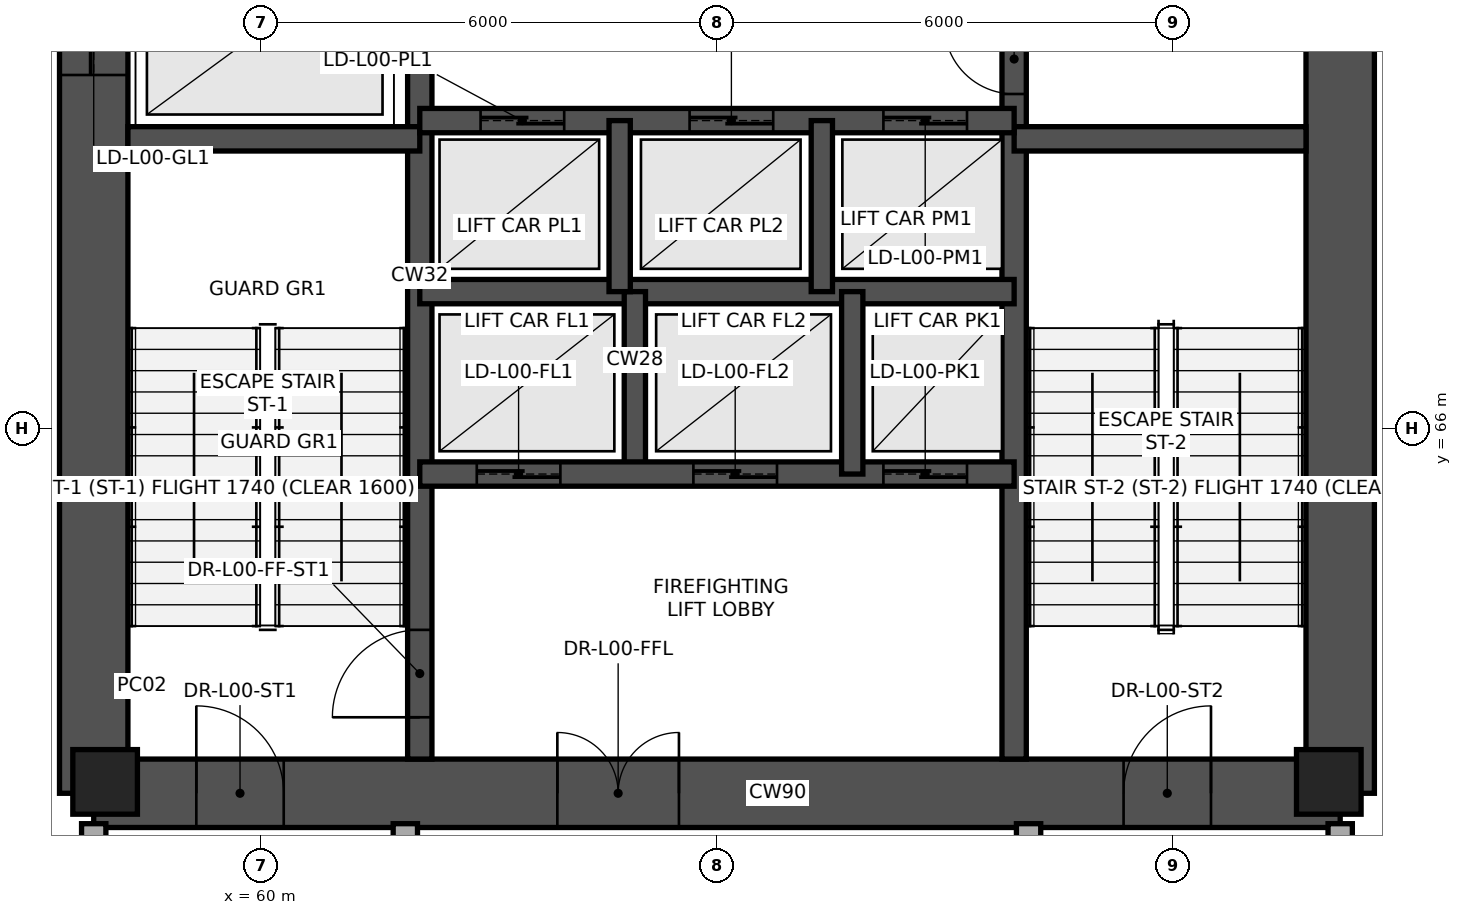
"""IFC4 building model, lengths in metres.
Left out: names, types, materials, properties, quantities, classifications, styles, units other than length and angle.
Written with IfcOpenShell. Run it as: python <this file> out.ifc"""

import sys

from ifc_helpers import new_model, si_unit, direction, frame, frame_2d, origin, origin_2d, place, context, subcontext, project, spatial, rectangle, extrude, element, fill, save


model = new_model("IFC4")
c1 = context("Model", 3, precision=1e-05, world=origin(), true_north=direction((0.0, 1.0)))
c2 = subcontext(c1, "Body", "Model", "MODEL_VIEW")
j1 = project(units=[si_unit("LENGTHUNIT", "METRE"), si_unit("PLANEANGLEUNIT", "RADIAN")], contexts=[c1])
p1 = place(None, origin())
s1 = spatial("IfcSite", under=j1, at=p1, CompositionType="ELEMENT")
p2 = place(p1, origin())
s2 = spatial("IfcBuilding", under=s1, at=p2, CompositionType="ELEMENT")
p3 = place(p2, origin())
s3 = spatial("IfcBuildingStorey", under=s2, at=p3, CompositionType="ELEMENT", Elevation=0.0)
p4 = place(p3, frame((57.8, 61.2, 0.0), z_axis=(0.0, 0.0, 1.0), x_axis=(1.0, 0.0, 0.0)))
e1 = element("IfcWall", 1, at=p4, inside=s3, PredefinedType="SHEAR", context=c2, shape_type="SweptSolid", body=[
    extrude(rectangle(XDim=16.4, YDim=0.9, at=frame_2d((8.2, 0.0))), origin(), (0.0, 0.0, 1.0), 5.4),
])
p5 = place(p4, frame((1.35, 0.0, 0.0)))
e2 = element("IfcOpeningElement", 2, at=p5, cuts=e1, PredefinedType="OPENING", context=c2, shape_type="SweptSolid", body=[
    extrude(rectangle(XDim=1.15, YDim=2.15, at=frame_2d((0.575, 1.075))), frame((0.0, 0.46, 0.0), z_axis=(0.0, -1.0, 0.0), x_axis=(1.0, 0.0, 0.0)), (0.0, 0.0, 1.0), 0.92),
])
p6 = place(p4, frame((6.1, 0.0, 0.0)))
e3 = element("IfcOpeningElement", 3, at=p6, cuts=e1, PredefinedType="OPENING", context=c2, shape_type="SweptSolid", body=[
    extrude(rectangle(XDim=1.6, YDim=2.15, at=frame_2d((0.8, 1.075))), frame((0.0, 0.46, 0.0), z_axis=(0.0, -1.0, 0.0), x_axis=(1.0, 0.0, 0.0)), (0.0, 0.0, 1.0), 0.92),
])
p7 = place(p4, frame((13.55, 0.0, 0.0)))
e4 = element("IfcOpeningElement", 4, at=p7, cuts=e1, PredefinedType="OPENING", context=c2, shape_type="SweptSolid", body=[
    extrude(rectangle(XDim=1.15, YDim=2.15, at=frame_2d((0.575, 1.075))), frame((0.0, 0.46, 0.0), z_axis=(0.0, -1.0, 0.0), x_axis=(1.0, 0.0, 0.0)), (0.0, 0.0, 1.0), 0.92),
])
p8 = place(p3, frame((74.2, 61.2, 0.0), z_axis=(0.0, 0.0, 1.0), x_axis=(0.0, 1.0, 0.0)))
e5 = element("IfcWall", 5, at=p8, inside=s3, PredefinedType="SHEAR", context=c2, shape_type="SweptSolid", body=[
    extrude(rectangle(XDim=13.6, YDim=0.9, at=frame_2d((6.8, 0.0))), origin(), (0.0, 0.0, 1.0), 5.4),
])
p9 = place(p3, frame((57.8, 74.8, 0.0), z_axis=(0.0, 0.0, 1.0), x_axis=(0.0, -1.0, 0.0)))
e6 = element("IfcWall", 6, at=p9, inside=s3, PredefinedType="SHEAR", context=c2, shape_type="SweptSolid", body=[
    extrude(rectangle(XDim=13.6, YDim=0.9, at=frame_2d((6.8, 0.0))), origin(), (0.0, 0.0, 1.0), 5.4),
])
p10 = place(p9, frame((0.85, 0.0, 0.0)))
e7 = element("IfcOpeningElement", 7, at=p10, cuts=e6, PredefinedType="OPENING", context=c2, shape_type="SweptSolid", body=[
    extrude(rectangle(XDim=0.92, YDim=2.05, at=frame_2d((0.46, 1.025))), frame((0.0, 0.46, 0.0), z_axis=(0.0, -1.0, 0.0), x_axis=(1.0, 0.0, 0.0)), (0.0, 0.0, 1.0), 0.92),
])
p11 = place(p9, frame((2.55, 0.0, 0.0)))
e8 = element("IfcOpeningElement", 8, at=p11, cuts=e6, PredefinedType="OPENING", context=c2, shape_type="SweptSolid", body=[
    extrude(rectangle(XDim=1.6, YDim=2.3, at=frame_2d((0.8, 1.15))), frame((0.0, 0.46, 0.0), z_axis=(0.0, -1.0, 0.0), x_axis=(1.0, 0.0, 0.0)), (0.0, 0.0, 1.0), 0.92),
])
p12 = place(p3, frame((62.09, 61.65, 0.0), z_axis=(0.0, 0.0, 1.0), x_axis=(0.0, 1.0, 0.0)))
e9 = element("IfcWall", 9, at=p12, inside=s3, PredefinedType="SHEAR", context=c2, shape_type="SweptSolid", body=[
    extrude(rectangle(XDim=12.7, YDim=0.32, at=frame_2d((6.35, 0.0))), origin(), (0.0, 0.0, 1.0), 5.4),
])
p13 = place(p12, frame((0.55, 0.0, 0.0)))
e10 = element("IfcOpeningElement", 10, at=p13, cuts=e9, PredefinedType="OPENING", context=c2, shape_type="SweptSolid", body=[
    extrude(rectangle(XDim=1.15, YDim=2.15, at=frame_2d((0.575, 1.075))), frame((0.0, 0.17, 0.0), z_axis=(0.0, -1.0, 0.0), x_axis=(1.0, 0.0, 0.0)), (0.0, 0.0, 1.0), 0.34),
])
p14 = place(p3, frame((69.91, 61.65, 0.0), z_axis=(0.0, 0.0, 1.0), x_axis=(0.0, 1.0, 0.0)))
e11 = element("IfcWall", 11, at=p14, inside=s3, PredefinedType="SHEAR", context=c2, shape_type="SweptSolid", body=[
    extrude(rectangle(XDim=12.7, YDim=0.32, at=frame_2d((6.35, 0.0))), origin(), (0.0, 0.0, 1.0), 5.4),
])
p15 = place(p14, frame((8.75, 0.0, 0.0)))
e12 = element("IfcOpeningElement", 12, at=p15, cuts=e11, PredefinedType="OPENING", context=c2, shape_type="SweptSolid", body=[
    extrude(rectangle(XDim=0.92, YDim=2.05, at=frame_2d((0.46, 1.025))), frame((0.0, 0.17, 0.0), z_axis=(0.0, -1.0, 0.0), x_axis=(1.0, 0.0, 0.0)), (0.0, 0.0, 1.0), 0.34),
])
for number, where, z_axis, x_axis in (
    (13, (58.25, 69.81, 0.0), (0.0, 0.0, 1.0), (1.0, 0.0, 0.0)),
    (14, (69.91, 69.81, 0.0), (0.0, 0.0, 1.0), (1.0, 0.0, 0.0)),
):
    element("IfcWall", number, at=place(p3, frame(where, z_axis=z_axis, x_axis=x_axis)), inside=s3, PredefinedType="SHEAR", context=c2, shape_type="SweptSolid", body=[
        extrude(rectangle(XDim=3.84, YDim=0.32, at=frame_2d((1.92, 0.0))), origin(), (0.0, 0.0, 1.0), 5.4),
    ])
p16 = place(p3, frame((62.09, 67.8, 0.0), z_axis=(0.0, 0.0, 1.0), x_axis=(1.0, 0.0, 0.0)))
e15 = element("IfcWall", 15, at=p16, inside=s3, PredefinedType="SHEAR", context=c2, shape_type="SweptSolid", body=[
    extrude(rectangle(XDim=7.82, YDim=0.32, at=frame_2d((3.91, 0.0))), origin(), (0.0, 0.0, 1.0), 5.4),
])
p17 = place(p3, frame((64.92, 65.4, 0.0), z_axis=(0.0, 0.0, 1.0), x_axis=(0.0, 1.0, 0.0)))
e16 = element("IfcWall", 16, at=p17, inside=s3, PredefinedType="SHEAR", context=c2, shape_type="SweptSolid", body=[
    extrude(rectangle(XDim=2.4, YDim=0.28, at=frame_2d((1.2, 0.0))), origin(), (0.0, 0.0, 1.0), 5.4),
])
p18 = place(p3, frame((62.09, 70.05, 0.0), z_axis=(0.0, 0.0, 1.0), x_axis=(1.0, 0.0, 0.0)))
e17 = element("IfcWall", 17, at=p18, inside=s3, PredefinedType="SHEAR", context=c2, shape_type="SweptSolid", body=[
    extrude(rectangle(XDim=7.82, YDim=0.32, at=frame_2d((3.91, 0.0))), origin(), (0.0, 0.0, 1.0), 5.4),
])
p19 = place(p18, frame((0.8, 0.0, 0.0)))
e18 = element("IfcOpeningElement", 18, at=p19, cuts=e17, PredefinedType="OPENING", context=c2, shape_type="SweptSolid", body=[
    extrude(rectangle(XDim=1.1, YDim=2.2, at=frame_2d((0.55, 1.1))), frame((0.0, 0.17, 0.0), z_axis=(0.0, -1.0, 0.0), x_axis=(1.0, 0.0, 0.0)), (0.0, 0.0, 1.0), 0.34),
])
p20 = place(p18, frame((3.55, 0.0, 0.0)))
e19 = element("IfcOpeningElement", 19, at=p20, cuts=e17, PredefinedType="OPENING", context=c2, shape_type="SweptSolid", body=[
    extrude(rectangle(XDim=1.1, YDim=2.2, at=frame_2d((0.55, 1.1))), frame((0.0, 0.17, 0.0), z_axis=(0.0, -1.0, 0.0), x_axis=(1.0, 0.0, 0.0)), (0.0, 0.0, 1.0), 0.34),
])
p21 = place(p18, frame((6.1, 0.0, 0.0)))
e20 = element("IfcOpeningElement", 20, at=p21, cuts=e17, PredefinedType="OPENING", context=c2, shape_type="SweptSolid", body=[
    extrude(rectangle(XDim=1.1, YDim=2.2, at=frame_2d((0.55, 1.1))), frame((0.0, 0.17, 0.0), z_axis=(0.0, -1.0, 0.0), x_axis=(1.0, 0.0, 0.0)), (0.0, 0.0, 1.0), 0.34),
])
p22 = place(p3, frame((62.09, 65.4, 0.0), z_axis=(0.0, 0.0, 1.0), x_axis=(1.0, 0.0, 0.0)))
e21 = element("IfcWall", 21, at=p22, inside=s3, PredefinedType="SHEAR", context=c2, shape_type="SweptSolid", body=[
    extrude(rectangle(XDim=7.82, YDim=0.32, at=frame_2d((3.91, 0.0))), origin(), (0.0, 0.0, 1.0), 5.4),
])
p23 = place(p22, frame((6.1, 0.0, 0.0)))
e22 = element("IfcOpeningElement", 22, at=p23, cuts=e21, PredefinedType="OPENING", context=c2, shape_type="SweptSolid", body=[
    extrude(rectangle(XDim=1.1, YDim=2.2, at=frame_2d((0.55, 1.1))), frame((0.0, 0.17, 0.0), z_axis=(0.0, -1.0, 0.0), x_axis=(1.0, 0.0, 0.0)), (0.0, 0.0, 1.0), 0.34),
])
p24 = place(p22, frame((0.75, 0.0, 0.0)))
e23 = element("IfcOpeningElement", 23, at=p24, cuts=e21, PredefinedType="OPENING", context=c2, shape_type="SweptSolid", body=[
    extrude(rectangle(XDim=1.1, YDim=2.2, at=frame_2d((0.55, 1.1))), frame((0.0, 0.17, 0.0), z_axis=(0.0, -1.0, 0.0), x_axis=(1.0, 0.0, 0.0)), (0.0, 0.0, 1.0), 0.34),
])
p25 = place(p22, frame((3.6, 0.0, 0.0)))
e24 = element("IfcOpeningElement", 24, at=p25, cuts=e21, PredefinedType="OPENING", context=c2, shape_type="SweptSolid", body=[
    extrude(rectangle(XDim=1.1, YDim=2.2, at=frame_2d((0.55, 1.1))), frame((0.0, 0.17, 0.0), z_axis=(0.0, -1.0, 0.0), x_axis=(1.0, 0.0, 0.0)), (0.0, 0.0, 1.0), 0.34),
])
p26 = place(p3, frame((67.78, 65.4, 0.0), z_axis=(0.0, 0.0, 1.0), x_axis=(0.0, 1.0, 0.0)))
e25 = element("IfcWall", 25, at=p26, inside=s3, PredefinedType="SHEAR", context=c2, shape_type="SweptSolid", body=[
    extrude(rectangle(XDim=2.4, YDim=0.28, at=frame_2d((1.2, 0.0))), origin(), (0.0, 0.0, 1.0), 5.4),
])
for number, where, z_axis, x_axis in (
    (26, (64.72, 67.8, 0.0), (0.0, 0.0, 1.0), (0.0, 1.0, 0.0)),
    (27, (67.38, 67.8, 0.0), (0.0, 0.0, 1.0), (0.0, 1.0, 0.0)),
):
    element("IfcWall", number, at=place(p3, frame(where, z_axis=z_axis, x_axis=x_axis)), inside=s3, PredefinedType="SHEAR", context=c2, shape_type="SweptSolid", body=[
        extrude(rectangle(XDim=2.25, YDim=0.28, at=frame_2d((1.125, 0.0))), origin(), (0.0, 0.0, 1.0), 5.4),
    ])
for number, where, z_axis, x_axis in (
    (28, (57.95, 61.35, 0.0), (0.0, 0.0, 1.0), (1.0, 0.0, 0.0)),
    (29, (74.05, 61.35, 0.0), (0.0, 0.0, 1.0), (1.0, 0.0, 0.0)),
):
    element("IfcColumn", number, at=place(p3, frame(where, z_axis=z_axis, x_axis=x_axis)), inside=s3, PredefinedType="COLUMN", context=c2, shape_type="SweptSolid", body=[
        extrude(rectangle(XDim=0.85, YDim=0.85, at=origin_2d()), origin(), (0.0, 0.0, 1.0), 5.4),
    ])
p27 = place(p3, frame((57.8, 44.05, 0.0), z_axis=(0.0, 0.0, 1.0), x_axis=(0.0, 1.0, 0.0)))
e30 = element("IfcWall", 30, at=p27, inside=s3, PredefinedType="STANDARD", context=c2, shape_type="SweptSolid", body=[
    extrude(rectangle(XDim=16.75, YDim=0.32, at=frame_2d((8.375, 0.0))), origin(), (0.0, 0.0, 1.0), 4.08),
])
p28 = place(p27, frame((12.8, 0.0, 0.0)))
e31 = element("IfcOpeningElement", 31, at=p28, cuts=e30, PredefinedType="OPENING", context=c2, shape_type="SweptSolid", body=[
    extrude(rectangle(XDim=1.15, YDim=2.15, at=frame_2d((0.575, 1.075))), frame((0.0, 0.17, 0.0), z_axis=(0.0, -1.0, 0.0), x_axis=(1.0, 0.0, 0.0)), (0.0, 0.0, 1.0), 0.34),
])
p29 = place(p3, frame((61.9, 44.05, 0.0), z_axis=(0.0, 0.0, 1.0), x_axis=(0.0, 1.0, 0.0)))
e32 = element("IfcWall", 32, at=p29, inside=s3, PredefinedType="STANDARD", context=c2, shape_type="SweptSolid", body=[
    extrude(rectangle(XDim=16.75, YDim=0.32, at=frame_2d((8.375, 0.0))), origin(), (0.0, 0.0, 1.0), 4.08),
])
p30 = place(p29, frame((11.4, 0.0, 0.0)))
e33 = element("IfcOpeningElement", 33, at=p30, cuts=e32, PredefinedType="OPENING", context=c2, shape_type="SweptSolid", body=[
    extrude(rectangle(XDim=1.15, YDim=2.15, at=frame_2d((0.575, 1.075))), frame((0.0, 0.17, 0.0), z_axis=(0.0, -1.0, 0.0), x_axis=(1.0, 0.0, 0.0)), (0.0, 0.0, 1.0), 0.34),
])
p31 = place(p3, frame((70.1, 44.05, 0.0), z_axis=(0.0, 0.0, 1.0), x_axis=(0.0, 1.0, 0.0)))
e34 = element("IfcWall", 34, at=p31, inside=s3, PredefinedType="STANDARD", context=c2, shape_type="SweptSolid", body=[
    extrude(rectangle(XDim=16.75, YDim=0.32, at=frame_2d((8.375, 0.0))), origin(), (0.0, 0.0, 1.0), 4.08),
])
p32 = place(p31, frame((3.5, 0.0, 0.0)))
e35 = element("IfcOpeningElement", 35, at=p32, cuts=e34, PredefinedType="OPENING", context=c2, shape_type="SweptSolid", body=[
    extrude(rectangle(XDim=1.15, YDim=2.15, at=frame_2d((0.575, 1.075))), frame((0.0, 0.17, 0.0), z_axis=(0.0, -1.0, 0.0), x_axis=(1.0, 0.0, 0.0)), (0.0, 0.0, 1.0), 0.34),
])
p33 = place(p3, frame((74.2, 44.05, 0.0), z_axis=(0.0, 0.0, 1.0), x_axis=(0.0, 1.0, 0.0)))
e36 = element("IfcWall", 36, at=p33, inside=s3, PredefinedType="STANDARD", context=c2, shape_type="SweptSolid", body=[
    extrude(rectangle(XDim=16.75, YDim=0.32, at=frame_2d((8.375, 0.0))), origin(), (0.0, 0.0, 1.0), 4.08),
])
p34 = place(p33, frame((6.425, 0.0, 0.0)))
e37 = element("IfcOpeningElement", 37, at=p34, cuts=e36, PredefinedType="OPENING", context=c2, shape_type="SweptSolid", body=[
    extrude(rectangle(XDim=1.15, YDim=2.15, at=frame_2d((0.575, 1.075))), frame((0.0, 0.17, 0.0), z_axis=(0.0, -1.0, 0.0), x_axis=(1.0, 0.0, 0.0)), (0.0, 0.0, 1.0), 0.34),
])
p35 = place(p13, origin())
e38 = element("IfcDoor", 38, at=p35, inside=s3, OperationType="SINGLE_SWING_LEFT", PredefinedType="DOOR", context=c2, shape_type="SweptSolid", body=[
    extrude(rectangle(XDim=1.15, YDim=2.15, at=frame_2d((0.575, 1.075))), frame((0.0, 0.025, 0.0), z_axis=(0.0, -1.0, 0.0), x_axis=(1.0, 0.0, 0.0)), (0.0, 0.0, 1.0), 0.05),
])
fill(e10, e38)
p36 = place(p23, origin())
e39 = element("IfcDoor", 39, at=p36, inside=s3, OperationType="SLIDING_TO_LEFT", PredefinedType="DOOR", context=c2, shape_type="SweptSolid", body=[
    extrude(rectangle(XDim=1.1, YDim=2.2, at=frame_2d((0.55, 1.1))), frame((0.0, 0.025, 0.0), z_axis=(0.0, -1.0, 0.0), x_axis=(1.0, 0.0, 0.0)), (0.0, 0.0, 1.0), 0.05),
])
fill(e22, e39)
p37 = place(p24, origin())
e40 = element("IfcDoor", 40, at=p37, inside=s3, OperationType="SLIDING_TO_LEFT", PredefinedType="DOOR", context=c2, shape_type="SweptSolid", body=[
    extrude(rectangle(XDim=1.1, YDim=2.2, at=frame_2d((0.55, 1.1))), frame((0.0, 0.025, 0.0), z_axis=(0.0, -1.0, 0.0), x_axis=(1.0, 0.0, 0.0)), (0.0, 0.0, 1.0), 0.05),
])
fill(e23, e40)
p38 = place(p25, origin())
e41 = element("IfcDoor", 41, at=p38, inside=s3, OperationType="SLIDING_TO_LEFT", PredefinedType="DOOR", context=c2, shape_type="SweptSolid", body=[
    extrude(rectangle(XDim=1.1, YDim=2.2, at=frame_2d((0.55, 1.1))), frame((0.0, 0.025, 0.0), z_axis=(0.0, -1.0, 0.0), x_axis=(1.0, 0.0, 0.0)), (0.0, 0.0, 1.0), 0.05),
])
fill(e24, e41)
p39 = place(p19, origin())
e42 = element("IfcDoor", 42, at=p39, inside=s3, OperationType="SLIDING_TO_LEFT", PredefinedType="DOOR", context=c2, shape_type="SweptSolid", body=[
    extrude(rectangle(XDim=1.1, YDim=2.2, at=frame_2d((0.55, 1.1))), frame((0.0, 0.025, 0.0), z_axis=(0.0, -1.0, 0.0), x_axis=(1.0, 0.0, 0.0)), (0.0, 0.0, 1.0), 0.05),
])
fill(e18, e42)
p40 = place(p20, origin())
e43 = element("IfcDoor", 43, at=p40, inside=s3, OperationType="SLIDING_TO_LEFT", PredefinedType="DOOR", context=c2, shape_type="SweptSolid", body=[
    extrude(rectangle(XDim=1.1, YDim=2.2, at=frame_2d((0.55, 1.1))), frame((0.0, 0.025, 0.0), z_axis=(0.0, -1.0, 0.0), x_axis=(1.0, 0.0, 0.0)), (0.0, 0.0, 1.0), 0.05),
])
fill(e19, e43)
p41 = place(p21, origin())
e44 = element("IfcDoor", 44, at=p41, inside=s3, OperationType="SLIDING_TO_LEFT", PredefinedType="DOOR", context=c2, shape_type="SweptSolid", body=[
    extrude(rectangle(XDim=1.1, YDim=2.2, at=frame_2d((0.55, 1.1))), frame((0.0, 0.025, 0.0), z_axis=(0.0, -1.0, 0.0), x_axis=(1.0, 0.0, 0.0)), (0.0, 0.0, 1.0), 0.05),
])
fill(e20, e44)
p42 = place(p5, origin())
e45 = element("IfcDoor", 45, at=p42, inside=s3, OperationType="SINGLE_SWING_LEFT", PredefinedType="DOOR", context=c2, shape_type="SweptSolid", body=[
    extrude(rectangle(XDim=1.15, YDim=2.15, at=frame_2d((0.575, 1.075))), frame((0.0, 0.025, 0.0), z_axis=(0.0, -1.0, 0.0), x_axis=(1.0, 0.0, 0.0)), (0.0, 0.0, 1.0), 0.05),
])
fill(e2, e45)
p43 = place(p6, origin())
e46 = element("IfcDoor", 46, at=p43, inside=s3, OperationType="DOUBLE_DOOR_SINGLE_SWING", PredefinedType="DOOR", context=c2, shape_type="SweptSolid", body=[
    extrude(rectangle(XDim=1.6, YDim=2.15, at=frame_2d((0.8, 1.075))), frame((0.0, 0.025, 0.0), z_axis=(0.0, -1.0, 0.0), x_axis=(1.0, 0.0, 0.0)), (0.0, 0.0, 1.0), 0.05),
])
fill(e3, e46)
p44 = place(p7, origin())
e47 = element("IfcDoor", 47, at=p44, inside=s3, OperationType="SINGLE_SWING_RIGHT", PredefinedType="DOOR", context=c2, shape_type="SweptSolid", body=[
    extrude(rectangle(XDim=1.15, YDim=2.15, at=frame_2d((0.575, 1.075))), frame((0.0, 0.025, 0.0), z_axis=(0.0, -1.0, 0.0), x_axis=(1.0, 0.0, 0.0)), (0.0, 0.0, 1.0), 0.05),
])
fill(e4, e47)
p45 = place(p11, origin())
e48 = element("IfcDoor", 48, at=p45, inside=s3, OperationType="DOUBLE_DOOR_SLIDING", PredefinedType="DOOR", context=c2, shape_type="SweptSolid", body=[
    extrude(rectangle(XDim=1.6, YDim=2.3, at=frame_2d((0.8, 1.15))), frame((0.0, 0.025, 0.0), z_axis=(0.0, -1.0, 0.0), x_axis=(1.0, 0.0, 0.0)), (0.0, 0.0, 1.0), 0.05),
])
fill(e8, e48)
p46 = place(p15, origin())
e49 = element("IfcDoor", 49, at=p46, inside=s3, OperationType="SINGLE_SWING_RIGHT", PredefinedType="DOOR", context=c2, shape_type="SweptSolid", body=[
    extrude(rectangle(XDim=0.92, YDim=2.05, at=frame_2d((0.46, 1.025))), frame((0.0, 0.025, 0.0), z_axis=(0.0, -1.0, 0.0), x_axis=(1.0, 0.0, 0.0)), (0.0, 0.0, 1.0), 0.05),
])
fill(e12, e49)
save(model, sys.argv[1])
